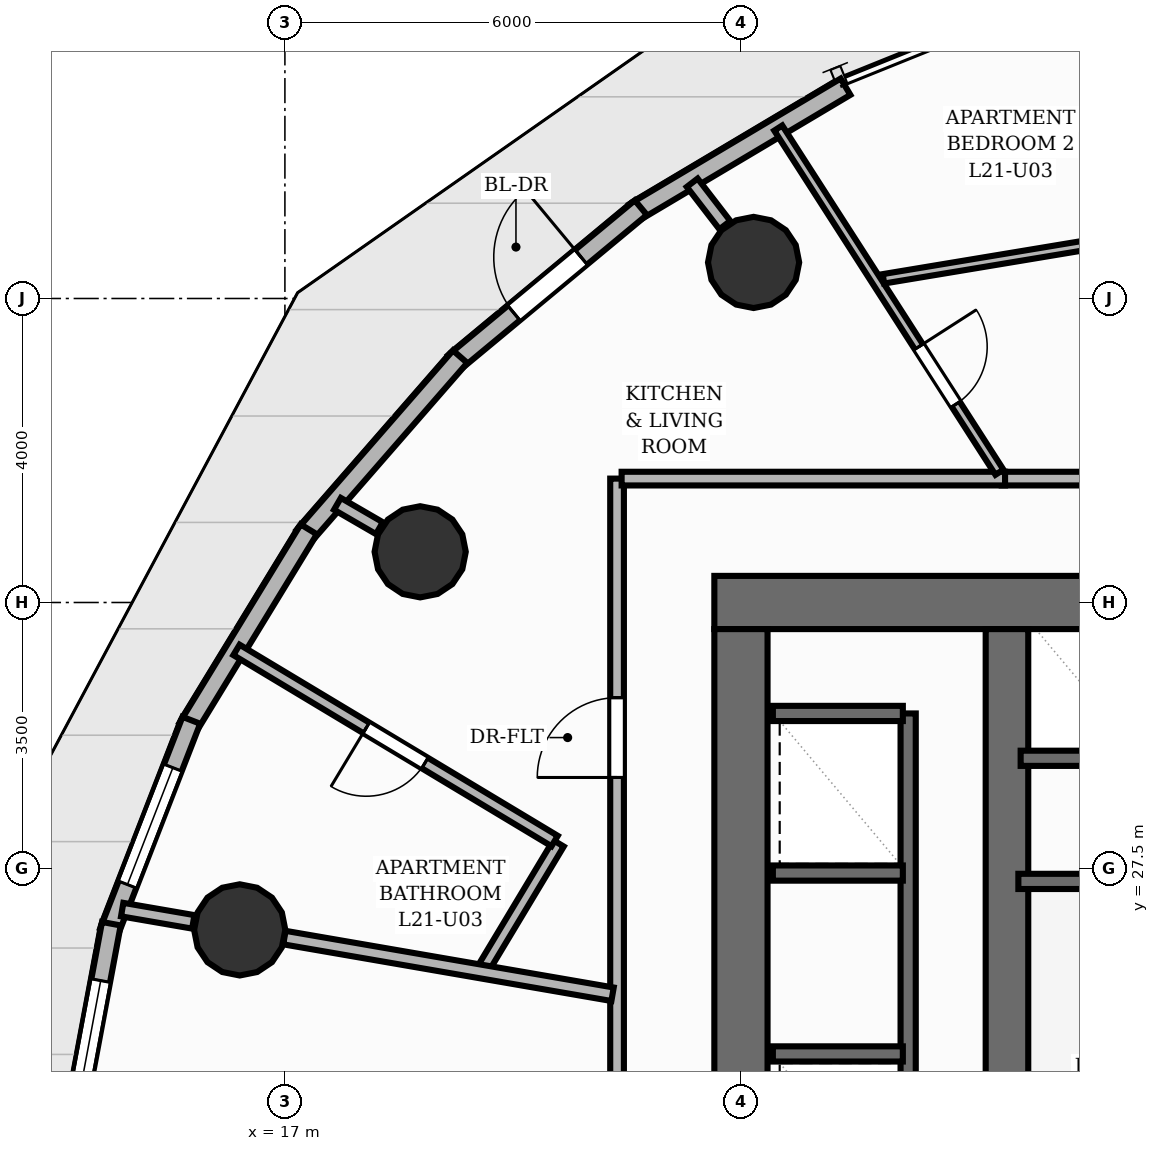
"""IFC4 building model, lengths in metres.
Left out: names, types, materials, properties, quantities, classifications, styles, units other than length and angle.
Written with IfcOpenShell. Run it as: python <this file> out.ifc"""

import sys

from ifc_helpers import new_model, si_unit, direction, frame, frame_2d, origin, origin_2d, place, context, subcontext, project, spatial, rectangle, circle, extrude, element, fill, save


model = new_model("IFC4")
c1 = context("Model", 3, precision=1e-05, world=origin(), true_north=direction((0.0, 1.0)))
c2 = subcontext(c1, "Body", "Model", "MODEL_VIEW")
j1 = project(units=[si_unit("LENGTHUNIT", "METRE"), si_unit("PLANEANGLEUNIT", "RADIAN")], contexts=[c1])
p1 = place(None, origin())
s1 = spatial("IfcSite", under=j1, at=p1, CompositionType="ELEMENT")
p2 = place(p1, origin())
s2 = spatial("IfcBuilding", under=s1, at=p2, CompositionType="ELEMENT")
p3 = place(p2, frame((0.0, 0.0, 74.08)))
s3 = spatial("IfcBuildingStorey", under=s2, at=p3, CompositionType="ELEMENT", Elevation=74.08)
p4 = place(p3, frame((22.65, 31.0, 0.0), z_axis=(0.0, 0.0, 1.0), x_axis=(1.0, 0.0, 0.0)))
e1 = element("IfcWall", 1, at=p4, inside=s3, PredefinedType="SHEAR", context=c2, shape_type="SweptSolid", body=[
    extrude(rectangle(XDim=18.7, YDim=0.7, at=frame_2d((9.35, 0.0))), origin(), (0.0, 0.0, 1.0), 3.2),
])
p5 = place(p4, frame((11.75, 0.0, 0.0)))
e2 = element("IfcOpeningElement", 2, at=p5, cuts=e1, PredefinedType="OPENING", context=c2, shape_type="SweptSolid", body=[
    extrude(rectangle(XDim=1.1, YDim=2.15, at=frame_2d((0.55, 1.075))), frame((0.0, 0.36, 0.0), z_axis=(0.0, -1.0, 0.0), x_axis=(1.0, 0.0, 0.0)), (0.0, 0.0, 1.0), 0.72),
])
p6 = place(p3, frame((23.0, 17.35, 0.0), z_axis=(0.0, 0.0, 1.0), x_axis=(0.0, 1.0, 0.0)))
e3 = element("IfcWall", 3, at=p6, inside=s3, PredefinedType="SHEAR", context=c2, shape_type="SweptSolid", body=[
    extrude(rectangle(XDim=13.3, YDim=0.7, at=frame_2d((6.65, 0.0))), origin(), (0.0, 0.0, 1.0), 3.2),
])
p7 = place(p3, frame((26.5, 17.35, 0.0), z_axis=(0.0, 0.0, 1.0), x_axis=(0.0, 1.0, 0.0)))
e4 = element("IfcWall", 4, at=p7, inside=s3, PredefinedType="SHEAR", context=c2, shape_type="SweptSolid", body=[
    extrude(rectangle(XDim=13.3, YDim=0.56, at=frame_2d((6.65, 0.0))), origin(), (0.0, 0.0, 1.0), 3.2),
])
for number, where, z_axis, x_axis in (
    (5, (23.167, 35.474, 0.0), (0.0, 0.0, 1.0), (1.0, 0.0, 0.0)),
    (6, (18.78, 31.667, 0.0), (0.0, 0.0, 1.0), (1.0, 0.0, 0.0)),
    (7, (16.406, 26.692, 0.0), (0.0, 0.0, 1.0), (1.0, 0.0, 0.0)),
):
    element("IfcColumn", number, at=place(p3, frame(where, z_axis=z_axis, x_axis=x_axis)), inside=s3, PredefinedType="COLUMN", context=c2, shape_type="SweptSolid", body=[
        extrude(circle(Radius=0.6, at=origin_2d()), origin(), (0.0, 0.0, 1.0), 3.2),
    ])
p8 = place(p3, frame((21.594, 36.132, 0.0), z_axis=(0.0, 0.0, 1.0), x_axis=(0.859543053771, 0.511063341196, 0.0)))
e8 = element("IfcWall", 8, at=p8, inside=s3, PredefinedType="SOLIDWALL", context=c2, shape_type="SweptSolid", body=[
    extrude(rectangle(XDim=3.236, YDim=0.25, at=frame_2d((1.618, 0.0))), origin(), (0.0, 0.0, 1.0), 2.96),
])
p9 = place(p3, frame((19.227, 34.157, 0.0), z_axis=(0.0, 0.0, 1.0), x_axis=(0.769611275013, 0.638512713557, 0.0)))
e9 = element("IfcWall", 9, at=p9, inside=s3, PredefinedType="SOLIDWALL", context=c2, shape_type="SweptSolid", body=[
    extrude(rectangle(XDim=3.192, YDim=0.25, at=frame_2d((1.596, 0.0))), origin(), (0.0, 0.0, 1.0), 2.96),
])
p10 = place(p9, frame((1.021, 0.0, 0.0)))
e10 = element("IfcOpeningElement", 10, at=p10, cuts=e9, PredefinedType="OPENING", context=c2, shape_type="SweptSolid", body=[
    extrude(rectangle(XDim=1.15, YDim=2.2, at=frame_2d((0.575, 1.1))), frame((0.0, 0.135, 0.0), z_axis=(0.0, -1.0, 0.0), x_axis=(1.0, 0.0, 0.0)), (0.0, 0.0, 1.0), 0.27),
])
p11 = place(p3, frame((17.248, 31.873, 0.0), z_axis=(0.0, 0.0, 1.0), x_axis=(0.656940925155, 0.753942054044, 0.0)))
e11 = element("IfcWall", 11, at=p11, inside=s3, PredefinedType="SOLIDWALL", context=c2, shape_type="SweptSolid", body=[
    extrude(rectangle(XDim=3.131, YDim=0.25, at=frame_2d((1.565, 0.0))), origin(), (0.0, 0.0, 1.0), 2.96),
])
p12 = place(p3, frame((15.719, 29.35, 0.0), z_axis=(0.0, 0.0, 1.0), x_axis=(0.520956264952, 0.853583370273, 0.0)))
e12 = element("IfcWall", 12, at=p12, inside=s3, PredefinedType="SOLIDWALL", context=c2, shape_type="SweptSolid", body=[
    extrude(rectangle(XDim=3.061, YDim=0.25, at=frame_2d((1.53, 0.0))), origin(), (0.0, 0.0, 1.0), 2.96),
])
p13 = place(p3, frame((14.686, 26.665, 0.0), z_axis=(0.0, 0.0, 1.0), x_axis=(0.362414720493, 0.93201693674, 0.0)))
e13 = element("IfcWall", 13, at=p13, inside=s3, PredefinedType="SOLIDWALL", context=c2, shape_type="SweptSolid", body=[
    extrude(rectangle(XDim=2.988, YDim=0.25, at=frame_2d((1.494, 0.0))), origin(), (0.0, 0.0, 1.0), 2.96),
])
p14 = place(p13, frame((0.669, 0.0, 0.85)))
e14 = element("IfcOpeningElement", 14, at=p14, cuts=e13, PredefinedType="OPENING", context=c2, shape_type="SweptSolid", body=[
    extrude(rectangle(XDim=1.65, YDim=1.37, at=frame_2d((0.825, 0.685))), frame((0.0, 0.135, 0.0), z_axis=(0.0, -1.0, 0.0), x_axis=(1.0, 0.0, 0.0)), (0.0, 0.0, 1.0), 0.27),
])
p15 = place(p3, frame((14.179, 23.9, 0.0), z_axis=(0.0, 0.0, 1.0), x_axis=(0.183975908968, 0.982930752861, 0.0)))
e15 = element("IfcWall", 15, at=p15, inside=s3, PredefinedType="SOLIDWALL", context=c2, shape_type="SweptSolid", body=[
    extrude(rectangle(XDim=2.923, YDim=0.25, at=frame_2d((1.462, 0.0))), origin(), (0.0, 0.0, 1.0), 2.96),
])
p16 = place(p15, frame((0.762, 0.0, 0.85)))
e16 = element("IfcOpeningElement", 16, at=p16, cuts=e15, PredefinedType="OPENING", context=c2, shape_type="SweptSolid", body=[
    extrude(rectangle(XDim=1.4, YDim=1.55, at=frame_2d((0.7, 0.775))), frame((0.0, 0.135, 0.0), z_axis=(0.0, -1.0, 0.0), x_axis=(1.0, 0.0, 0.0)), (0.0, 0.0, 1.0), 0.27),
])
p17 = place(p3, frame((26.65, 27.33, 0.0), z_axis=(0.0, 0.0, 1.0), x_axis=(1.0, 0.0, 0.0)))
e17 = element("IfcWall", 17, at=p17, inside=s3, PredefinedType="SHEAR", context=c2, shape_type="SweptSolid", body=[
    extrude(rectangle(XDim=3.24, YDim=0.2, at=frame_2d((1.62, 0.0))), origin(), (0.0, 0.0, 1.0), 3.2),
])
p18 = place(p3, frame((25.2, 18.46, 0.0), z_axis=(0.0, 0.0, 1.0), x_axis=(0.0, 1.0, 0.0)))
e18 = element("IfcWall", 18, at=p18, inside=s3, PredefinedType="SHEAR", context=c2, shape_type="SweptSolid", body=[
    extrude(rectangle(XDim=11.08, YDim=0.2, at=frame_2d((5.54, 0.0))), origin(), (0.0, 0.0, 1.0), 3.2),
])
for number, where, z_axis, x_axis in (
    (19, (23.42, 29.54, 0.0), (0.0, 0.0, 1.0), (1.0, 0.0, 0.0)),
    (20, (23.42, 25.06, 0.0), (0.0, 0.0, 1.0), (1.0, 0.0, 0.0)),
    (21, (23.42, 27.44, 0.0), (0.0, 0.0, 1.0), (1.0, 0.0, 0.0)),
):
    element("IfcWall", number, at=place(p3, frame(where, z_axis=z_axis, x_axis=x_axis)), inside=s3, PredefinedType="SHEAR", context=c2, shape_type="SweptSolid", body=[
        extrude(rectangle(XDim=1.71, YDim=0.2, at=frame_2d((0.855, 0.0))), origin(), (0.0, 0.0, 1.0), 3.2),
    ])
p19 = place(p3, frame((26.68, 28.95, 0.0), z_axis=(0.0, 0.0, 1.0), x_axis=(1.0, 0.0, 0.0)))
e22 = element("IfcWall", 22, at=p19, inside=s3, PredefinedType="SHEAR", context=c2, shape_type="SweptSolid", body=[
    extrude(rectangle(XDim=5.24, YDim=0.2, at=frame_2d((2.62, 0.0))), origin(), (0.0, 0.0, 1.0), 3.2),
])
p20 = place(p3, frame((22.788, 35.966, 0.0), z_axis=(0.0, 0.0, 1.0), x_axis=(-0.609945476355, 0.792443383387, 0.0)))
e23 = element("IfcWall", 23, at=p20, inside=s3, PredefinedType="PARTITIONING", context=c2, shape_type="SweptSolid", body=[
    extrude(rectangle(XDim=0.704, YDim=0.18, at=frame_2d((0.352, 0.0))), origin(), (0.0, 0.0, 1.0), 2.26),
])
p21 = place(p3, frame((18.243, 31.978, 0.0), z_axis=(0.0, 0.0, 1.0), x_axis=(-0.864928236137, 0.501895553212, 0.0)))
e24 = element("IfcWall", 24, at=p21, inside=s3, PredefinedType="PARTITIONING", context=c2, shape_type="SweptSolid", body=[
    extrude(rectangle(XDim=0.638, YDim=0.18, at=frame_2d((0.319, 0.0))), origin(), (0.0, 0.0, 1.0), 2.26),
])
p22 = place(p3, frame((15.794, 26.798, 0.0), z_axis=(0.0, 0.0, 1.0), x_axis=(-0.985396187556, 0.170277284302, 0.0)))
e25 = element("IfcWall", 25, at=p22, inside=s3, PredefinedType="PARTITIONING", context=c2, shape_type="SweptSolid", body=[
    extrude(rectangle(XDim=0.949, YDim=0.18, at=frame_2d((0.475, 0.0))), origin(), (0.0, 0.0, 1.0), 2.26),
])
p23 = place(p3, frame((26.431, 32.63, 0.0), z_axis=(0.0, 0.0, 1.0), x_axis=(1.0, 0.0, 0.0)))
e26 = element("IfcWall", 26, at=p23, inside=s3, PredefinedType="PARTITIONING", context=c2, shape_type="SweptSolid", body=[
    extrude(rectangle(XDim=16.199, YDim=0.18, at=frame_2d((8.099, 0.0))), origin(), (0.0, 0.0, 1.0), 2.955),
])
p24 = place(p23, frame((11.645, 0.0, 0.0)))
e27 = element("IfcOpeningElement", 27, at=p24, cuts=e26, PredefinedType="OPENING", context=c2, shape_type="SweptSolid", body=[
    extrude(rectangle(XDim=1.05, YDim=2.15, at=frame_2d((0.525, 1.075))), frame((0.0, 0.1, 0.0), z_axis=(0.0, -1.0, 0.0), x_axis=(1.0, 0.0, 0.0)), (0.0, 0.0, 1.0), 0.2),
])
p25 = place(p3, frame((21.37, 15.37, 0.0), z_axis=(0.0, 0.0, 1.0), x_axis=(0.0, 1.0, 0.0)))
e28 = element("IfcWall", 28, at=p25, inside=s3, PredefinedType="PARTITIONING", context=c2, shape_type="SweptSolid", body=[
    extrude(rectangle(XDim=17.26, YDim=0.18, at=frame_2d((8.63, 0.0))), origin(), (0.0, 0.0, 1.0), 2.955),
])
p26 = place(p25, frame((13.328, 0.0, 0.0)))
e29 = element("IfcOpeningElement", 29, at=p26, cuts=e28, PredefinedType="OPENING", context=c2, shape_type="SweptSolid", body=[
    extrude(rectangle(XDim=1.05, YDim=2.15, at=frame_2d((0.525, 1.075))), frame((0.0, 0.1, 0.0), z_axis=(0.0, -1.0, 0.0), x_axis=(1.0, 0.0, 0.0)), (0.0, 0.0, 1.0), 0.2),
])
p27 = place(p25, frame((4.718, 0.0, 0.0)))
e30 = element("IfcOpeningElement", 30, at=p27, cuts=e28, PredefinedType="OPENING", context=c2, shape_type="SweptSolid", body=[
    extrude(rectangle(XDim=1.05, YDim=2.15, at=frame_2d((0.525, 1.075))), frame((0.0, 0.1, 0.0), z_axis=(0.0, -1.0, 0.0), x_axis=(1.0, 0.0, 0.0)), (0.0, 0.0, 1.0), 0.2),
])
p28 = place(p3, frame((21.43, 32.63, 0.0), z_axis=(0.0, 0.0, 1.0), x_axis=(1.0, 0.0, 0.0)))
e31 = element("IfcWall", 31, at=p28, inside=s3, PredefinedType="PARTITIONING", context=c2, shape_type="SweptSolid", body=[
    extrude(rectangle(XDim=5.045, YDim=0.18, at=frame_2d((2.522, 0.0))), origin(), (0.0, 0.0, 1.0), 2.955),
])
p29 = place(p3, frame((19.586, 26.143, 0.0), z_axis=(0.0, 0.0, 1.0), x_axis=(0.514969792399, 0.857208325272, 0.0)))
e32 = element("IfcWall", 32, at=p29, inside=s3, PredefinedType="PLUMBINGWALL", context=c2, shape_type="SweptSolid", body=[
    extrude(rectangle(XDim=1.969, YDim=0.16, at=frame_2d((0.984, 0.0))), origin(), (0.0, 0.0, 1.0), 2.955),
])
p30 = place(p3, frame((20.549, 27.862, 0.0), z_axis=(0.0, 0.0, 1.0), x_axis=(-0.857214854591, 0.514958923672, 0.0)))
e33 = element("IfcWall", 33, at=p30, inside=s3, PredefinedType="PLUMBINGWALL", context=c2, shape_type="SweptSolid", body=[
    extrude(rectangle(XDim=4.883, YDim=0.16, at=frame_2d((2.441, 0.0))), origin(), (0.0, 0.0, 1.0), 2.955),
])
p31 = place(p30, frame((1.991, 0.0, 0.0)))
e34 = element("IfcOpeningElement", 34, at=p31, cuts=e33, PredefinedType="OPENING", context=c2, shape_type="SweptSolid", body=[
    extrude(rectangle(XDim=0.9, YDim=2.1, at=frame_2d((0.45, 1.05))), frame((0.0, 0.09, 0.0), z_axis=(0.0, -1.0, 0.0), x_axis=(1.0, 0.0, 0.0)), (0.0, 0.0, 1.0), 0.18),
])
p32 = place(p3, frame((23.491, 37.243, 0.0), z_axis=(0.0, 0.0, 1.0), x_axis=(0.540565030624, -0.841302233247, 0.0)))
e35 = element("IfcWall", 35, at=p32, inside=s3, PredefinedType="PARTITIONING", context=c2, shape_type="SweptSolid", body=[
    extrude(rectangle(XDim=5.383, YDim=0.125, at=frame_2d((2.691, 0.0))), origin(), (0.0, 0.0, 1.0), 2.955),
])
p33 = place(p32, frame((3.42, 0.0, 0.0)))
e36 = element("IfcOpeningElement", 36, at=p33, cuts=e35, PredefinedType="OPENING", context=c2, shape_type="SweptSolid", body=[
    extrude(rectangle(XDim=0.9, YDim=2.1, at=frame_2d((0.45, 1.05))), frame((0.0, 0.073, 0.0), z_axis=(0.0, -1.0, 0.0), x_axis=(1.0, 0.0, 0.0)), (0.0, 0.0, 1.0), 0.145),
])
p34 = place(p3, frame((21.311, 25.845, 0.0), z_axis=(0.0, 0.0, 1.0), x_axis=(-0.98541310568, 0.170179349963, 0.0)))
e37 = element("IfcWall", 37, at=p34, inside=s3, PredefinedType="PARTITIONING", context=c2, shape_type="SweptSolid", body=[
    extrude(rectangle(XDim=4.381, YDim=0.18, at=frame_2d((2.191, 0.0))), origin(), (0.0, 0.0, 1.0), 2.26),
])
p35 = place(p3, frame((24.875, 35.259, 0.0), z_axis=(0.0, 0.0, 1.0), x_axis=(0.986466792703, 0.163961174958, 0.0)))
e38 = element("IfcWall", 38, at=p35, inside=s3, PredefinedType="PARTITIONING", context=c2, shape_type="SweptSolid", body=[
    extrude(rectangle(XDim=10.128, YDim=0.125, at=frame_2d((5.064, 0.0))), origin(), (0.0, 0.0, 1.0), 2.955),
])
p36 = place(p35, frame((5.034, 0.0, 0.0)))
e39 = element("IfcOpeningElement", 39, at=p36, cuts=e38, PredefinedType="OPENING", context=c2, shape_type="SweptSolid", body=[
    extrude(rectangle(XDim=0.9, YDim=2.1, at=frame_2d((0.45, 1.05))), frame((0.0, 0.073, 0.0), z_axis=(0.0, -1.0, 0.0), x_axis=(1.0, 0.0, 0.0)), (0.0, 0.0, 1.0), 0.145),
])
p37 = place(p10, origin())
e40 = element("IfcDoor", 40, at=p37, inside=s3, OperationType="SINGLE_SWING_RIGHT", PredefinedType="DOOR", context=c2, shape_type="SweptSolid", body=[
    extrude(rectangle(XDim=1.15, YDim=2.2, at=frame_2d((0.575, 1.1))), frame((0.0, 0.025, 0.0), z_axis=(0.0, -1.0, 0.0), x_axis=(1.0, 0.0, 0.0)), (0.0, 0.0, 1.0), 0.05),
])
fill(e10, e40)
p38 = place(p14, origin())
e41 = element("IfcWindow", 41, at=p38, inside=s3, PartitioningType="SINGLE_PANEL", PredefinedType="WINDOW", context=c2, shape_type="SweptSolid", body=[
    extrude(rectangle(XDim=1.65, YDim=1.37, at=frame_2d((0.825, 0.685))), frame((0.0, 0.03, 0.0), z_axis=(0.0, -1.0, 0.0), x_axis=(1.0, 0.0, 0.0)), (0.0, 0.0, 1.0), 0.06),
])
fill(e14, e41)
p39 = place(p16, origin())
e42 = element("IfcWindow", 42, at=p39, inside=s3, PartitioningType="SINGLE_PANEL", PredefinedType="WINDOW", context=c2, shape_type="SweptSolid", body=[
    extrude(rectangle(XDim=1.4, YDim=1.55, at=frame_2d((0.7, 0.775))), frame((0.0, 0.03, 0.0), z_axis=(0.0, -1.0, 0.0), x_axis=(1.0, 0.0, 0.0)), (0.0, 0.0, 1.0), 0.06),
])
fill(e16, e42)
p40 = place(p26, origin())
e43 = element("IfcDoor", 43, at=p40, inside=s3, OperationType="SINGLE_SWING_LEFT", PredefinedType="DOOR", context=c2, shape_type="SweptSolid", body=[
    extrude(rectangle(XDim=1.05, YDim=2.15, at=frame_2d((0.525, 1.075))), frame((0.0, 0.025, 0.0), z_axis=(0.0, -1.0, 0.0), x_axis=(1.0, 0.0, 0.0)), (0.0, 0.0, 1.0), 0.05),
])
fill(e29, e43)
p41 = place(p31, origin())
e44 = element("IfcDoor", 44, at=p41, inside=s3, OperationType="SINGLE_SWING_RIGHT", PredefinedType="DOOR", context=c2, shape_type="SweptSolid", body=[
    extrude(rectangle(XDim=0.9, YDim=2.1, at=frame_2d((0.45, 1.05))), frame((0.0, 0.025, 0.0), z_axis=(0.0, -1.0, 0.0), x_axis=(1.0, 0.0, 0.0)), (0.0, 0.0, 1.0), 0.05),
])
fill(e34, e44)
p42 = place(p33, origin())
e45 = element("IfcDoor", 45, at=p42, inside=s3, OperationType="SINGLE_SWING_LEFT", PredefinedType="DOOR", context=c2, shape_type="SweptSolid", body=[
    extrude(rectangle(XDim=0.9, YDim=2.1, at=frame_2d((0.45, 1.05))), frame((0.0, 0.025, 0.0), z_axis=(0.0, -1.0, 0.0), x_axis=(1.0, 0.0, 0.0)), (0.0, 0.0, 1.0), 0.05),
])
fill(e36, e45)
save(model, sys.argv[1])
